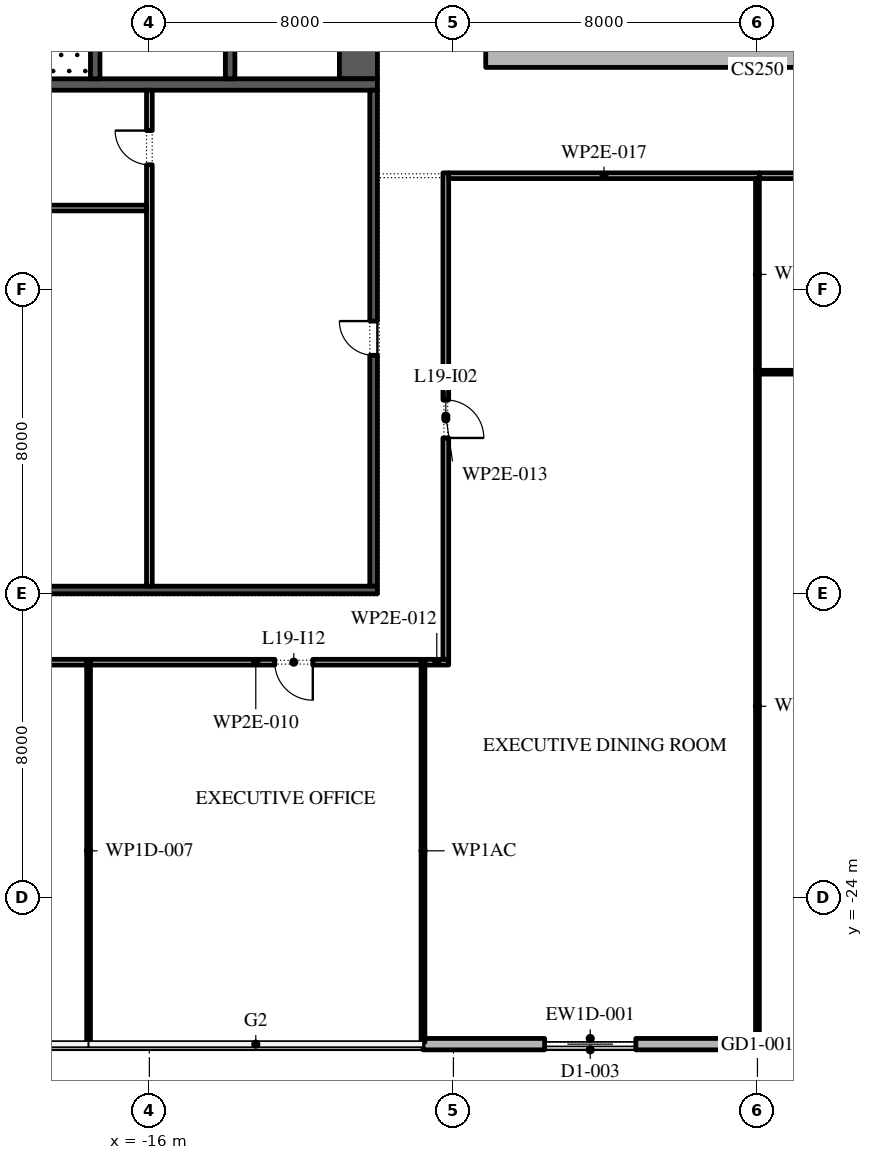
"""IFC4 building model, lengths in metres.
Left out: names, types, materials, properties, quantities, classifications, styles, units other than length and angle.
Written with IfcOpenShell. Run it as: python <this file> out.ifc"""

import sys

from ifc_helpers import new_model, si_unit, direction, frame, frame_2d, origin, place, context, subcontext, project, spatial, polyline, rectangle, outline, extrude, element, fill, save


model = new_model("IFC4")
c1 = context("Model", 3, precision=1e-05, world=origin(), true_north=direction((0.0, 1.0)))
c2 = subcontext(c1, "Body", "Model", "MODEL_VIEW")
j1 = project(units=[si_unit("LENGTHUNIT", "METRE"), si_unit("PLANEANGLEUNIT", "RADIAN")], contexts=[c1])
p1 = place(None, origin())
s1 = spatial("IfcSite", under=j1, at=p1, CompositionType="ELEMENT")
p2 = place(p1, origin())
s2 = spatial("IfcBuilding", under=s1, at=p2, CompositionType="ELEMENT")
p3 = place(p2, frame((0.0, 0.0, 90.0)))
s3 = spatial("IfcBuildingStorey", under=s2, at=p3, CompositionType="ELEMENT", Elevation=90.0)
p4 = place(p3, origin())
e1 = element("IfcWall", 1, at=p4, inside=s3, PredefinedType="STANDARD", context=c2, shape_type="SweptSolid", body=[
    extrude(outline(polyline([(-7.15, -2.15), (7.15, -2.15), (7.15, 16.15), (-7.15, 16.15), (-7.15, -2.15)]), holes=[polyline([(-7.0, -2.0), (-7.0, 16.0), (7.0, 16.0), (7.0, -2.0), (-7.0, -2.0)])]), origin(), (0.0, 0.0, 1.0), 3.9),
])
p5 = place(p3, frame((-8.8, -27.85, 0.0), z_axis=(0.0, 0.0, 1.0), x_axis=(1.0, 0.0, 0.0)))
e2 = element("IfcWall", 2, at=p5, inside=s3, PredefinedType="STANDARD", context=c2, shape_type="SweptSolid", body=[
    extrude(rectangle(XDim=8.8, YDim=0.3, at=frame_2d((4.4, 0.0))), origin(), (0.0, 0.0, 1.0), 3.9),
])
p6 = place(p5, frame((3.2, 0.0, 0.0)))
e3 = element("IfcOpeningElement", 3, at=p6, cuts=e2, PredefinedType="OPENING", context=c2, shape_type="SweptSolid", body=[
    extrude(rectangle(XDim=2.4, YDim=3.5, at=frame_2d((1.2, 1.75))), frame((0.0, 0.16, 0.0), z_axis=(0.0, -1.0, 0.0), x_axis=(1.0, 0.0, 0.0)), (0.0, 0.0, 1.0), 0.32),
])
p7 = place(p3, frame((-10.5, -2.45, 0.0), z_axis=(0.0, 0.0, 1.0), x_axis=(0.0, 1.0, 0.0)))
e4 = element("IfcWall", 4, at=p7, inside=s3, PredefinedType="SHEAR", context=c2, shape_type="SweptSolid", body=[
    extrude(rectangle(XDim=27.9, YDim=1.0, at=frame_2d((13.95, 0.0))), origin(), (0.0, 0.0, 1.0), 3.9),
])
p8 = place(p7, frame((23.65, 0.0, 0.0)))
e5 = element("IfcOpeningElement", 5, at=p8, cuts=e4, PredefinedType="OPENING", context=c2, shape_type="SweptSolid", body=[
    extrude(rectangle(XDim=2.4, YDim=2.1, at=frame_2d((1.2, 1.05))), frame((0.0, 0.51, 0.0), z_axis=(0.0, -1.0, 0.0), x_axis=(1.0, 0.0, 0.0)), (0.0, 0.0, 1.0), 1.02),
])
p9 = place(p7, frame((0.788, 0.0, 0.0)))
e6 = element("IfcOpeningElement", 6, at=p9, cuts=e4, PredefinedType="OPENING", context=c2, shape_type="SweptSolid", body=[
    extrude(rectangle(XDim=0.9, YDim=2.1, at=frame_2d((0.45, 1.05))), frame((0.0, 0.51, 0.0), z_axis=(0.0, -1.0, 0.0), x_axis=(1.0, 0.0, 0.0)), (0.0, 0.0, 1.0), 1.02),
])
p10 = place(p7, frame((4.012, 0.0, 0.0)))
e7 = element("IfcOpeningElement", 7, at=p10, cuts=e4, PredefinedType="OPENING", context=c2, shape_type="SweptSolid", body=[
    extrude(rectangle(XDim=0.9, YDim=2.1, at=frame_2d((0.45, 1.05))), frame((0.0, 0.51, 0.0), z_axis=(0.0, -1.0, 0.0), x_axis=(1.0, 0.0, 0.0)), (0.0, 0.0, 1.0), 1.02),
])
p11 = place(p3, frame((-22.0, -2.6, 0.0), z_axis=(0.0, 0.0, 1.0), x_axis=(1.0, 0.0, 0.0)))
e8 = element("IfcWall", 8, at=p11, inside=s3, PredefinedType="SHEAR", context=c2, shape_type="SweptSolid", body=[
    extrude(rectangle(XDim=12.0, YDim=0.3, at=frame_2d((6.0, 0.0))), origin(), (0.0, 0.0, 1.0), 3.9),
])
p12 = place(p3, frame((-17.425, -2.45, 0.0), z_axis=(0.0, 0.0, 1.0), x_axis=(0.0, 1.0, 0.0)))
e9 = element("IfcWall", 9, at=p12, inside=s3, PredefinedType="SHEAR", context=c2, shape_type="SweptSolid", body=[
    extrude(rectangle(XDim=6.3, YDim=0.25, at=frame_2d((3.15, 0.0))), origin(), (0.0, 0.0, 1.0), 3.9),
])
p13 = place(p12, frame((5.05, 0.0, 0.0)))
e10 = element("IfcOpeningElement", 10, at=p13, cuts=e9, PredefinedType="OPENING", context=c2, shape_type="SweptSolid", body=[
    extrude(rectangle(XDim=1.2, YDim=2.1, at=frame_2d((0.6, 1.05))), frame((0.0, 0.135, 0.0), z_axis=(0.0, -1.0, 0.0), x_axis=(1.0, 0.0, 0.0)), (0.0, 0.0, 1.0), 0.27),
])
p14 = place(p3, frame((-13.875, -2.45, 0.0), z_axis=(0.0, 0.0, 1.0), x_axis=(0.0, 1.0, 0.0)))
e11 = element("IfcWall", 11, at=p14, inside=s3, PredefinedType="SHEAR", context=c2, shape_type="SweptSolid", body=[
    extrude(rectangle(XDim=21.3, YDim=0.25, at=frame_2d((10.65, 0.0))), origin(), (0.0, 0.0, 1.0), 3.9),
])
p15 = place(p14, frame((10.396, 0.0, 0.0)))
e12 = element("IfcOpeningElement", 12, at=p15, cuts=e11, PredefinedType="OPENING", context=c2, shape_type="SweptSolid", body=[
    extrude(rectangle(XDim=0.9, YDim=2.1, at=frame_2d((0.45, 1.05))), frame((0.0, 0.135, 0.0), z_axis=(0.0, -1.0, 0.0), x_axis=(1.0, 0.0, 0.0)), (0.0, 0.0, 1.0), 0.27),
])
p16 = place(p14, frame((14.6, 0.0, 0.0)))
e13 = element("IfcOpeningElement", 13, at=p16, cuts=e11, PredefinedType="OPENING", context=c2, shape_type="SweptSolid", body=[
    extrude(rectangle(XDim=0.9, YDim=2.1, at=frame_2d((0.45, 1.05))), frame((0.0, 0.135, 0.0), z_axis=(0.0, -1.0, 0.0), x_axis=(1.0, 0.0, 0.0)), (0.0, 0.0, 1.0), 0.27),
])
p17 = place(p14, frame((18.775, 0.0, 0.0)))
e14 = element("IfcOpeningElement", 14, at=p17, cuts=e11, PredefinedType="OPENING", context=c2, shape_type="SweptSolid", body=[
    extrude(rectangle(XDim=0.9, YDim=2.1, at=frame_2d((0.45, 1.05))), frame((0.0, 0.135, 0.0), z_axis=(0.0, -1.0, 0.0), x_axis=(1.0, 0.0, 0.0)), (0.0, 0.0, 1.0), 0.27),
])
p18 = place(p14, frame((6.971, 0.0, 0.0)))
e15 = element("IfcOpeningElement", 15, at=p18, cuts=e11, PredefinedType="OPENING", context=c2, shape_type="SweptSolid", body=[
    extrude(rectangle(XDim=1.1, YDim=2.1, at=frame_2d((0.55, 1.05))), frame((0.0, 0.135, 0.0), z_axis=(0.0, -1.0, 0.0), x_axis=(1.0, 0.0, 0.0)), (0.0, 0.0, 1.0), 0.27),
])
p19 = place(p3, frame((-10.1, -15.8, 0.0), z_axis=(0.0, 0.0, 1.0), x_axis=(0.0, 1.0, 0.0)))
e16 = element("IfcWall", 16, at=p19, inside=s3, PredefinedType="SHEAR", context=c2, shape_type="SweptSolid", body=[
    extrude(rectangle(XDim=13.05, YDim=0.2, at=frame_2d((6.525, 0.0))), origin(), (0.0, 0.0, 1.0), 3.9),
])
p20 = place(p19, frame((6.075, 0.0, 0.0)))
e17 = element("IfcOpeningElement", 17, at=p20, cuts=e16, PredefinedType="OPENING", context=c2, shape_type="SweptSolid", body=[
    extrude(rectangle(XDim=0.9, YDim=2.1, at=frame_2d((0.45, 1.05))), frame((0.0, 0.11, 0.0), z_axis=(0.0, -1.0, 0.0), x_axis=(1.0, 0.0, 0.0)), (0.0, 0.0, 1.0), 0.22),
])
p21 = place(p3, frame((-22.0, -15.9, 0.0), z_axis=(0.0, 0.0, 1.0), x_axis=(1.0, 0.0, 0.0)))
e18 = element("IfcWall", 18, at=p21, inside=s3, PredefinedType="SHEAR", context=c2, shape_type="SweptSolid", body=[
    extrude(rectangle(XDim=12.0, YDim=0.2, at=frame_2d((6.0, 0.0))), origin(), (0.0, 0.0, 1.0), 3.9),
])
p22 = place(p3, frame((-16.0, -15.8, 0.0), z_axis=(0.0, 0.0, 1.0), x_axis=(0.0, 1.0, 0.0)))
e19 = element("IfcWall", 19, at=p22, inside=s3, PredefinedType="PARTITIONING", context=c2, shape_type="SweptSolid", body=[
    extrude(rectangle(XDim=13.05, YDim=0.15, at=frame_2d((6.525, 0.0))), origin(), (0.0, 0.0, 1.0), 3.9),
])
p23 = place(p22, frame((11.087, 0.0, 0.0)))
e20 = element("IfcOpeningElement", 20, at=p23, cuts=e19, PredefinedType="OPENING", context=c2, shape_type="SweptSolid", body=[
    extrude(rectangle(XDim=0.9, YDim=2.1, at=frame_2d((0.45, 1.05))), frame((0.0, 0.085, 0.0), z_axis=(0.0, -1.0, 0.0), x_axis=(1.0, 0.0, 0.0)), (0.0, 0.0, 1.0), 0.17),
])
p24 = place(p3, frame((-21.8, -5.85, 0.0), z_axis=(0.0, 0.0, 1.0), x_axis=(1.0, 0.0, 0.0)))
e21 = element("IfcWall", 21, at=p24, inside=s3, PredefinedType="PARTITIONING", context=c2, shape_type="SweptSolid", body=[
    extrude(rectangle(XDim=5.725, YDim=0.15, at=frame_2d((2.863, 0.0))), origin(), (0.0, 0.0, 1.0), 3.9),
])
p25 = place(p3, frame((-17.6, -27.8, 0.0), z_axis=(0.0, 0.0, 1.0), x_axis=(0.0, 1.0, 0.0)))
e22 = element("IfcWall", 22, at=p25, inside=s3, PredefinedType="PARTITIONING", context=c2, shape_type="SweptSolid", body=[
    extrude(rectangle(XDim=10.075, YDim=0.1, at=frame_2d((5.038, 0.0))), origin(), (0.0, 0.0, 1.0), 3.9),
])
p26 = place(p3, frame((-17.65, -17.8, 0.0), z_axis=(0.0, 0.0, 1.0), x_axis=(-1.0, 0.0, 0.0)))
e23 = element("IfcWall", 23, at=p26, inside=s3, PredefinedType="PARTITIONING", context=c2, shape_type="SweptSolid", body=[
    extrude(rectangle(XDim=6.075, YDim=0.15, at=frame_2d((3.038, 0.0))), origin(), (0.0, 0.0, 1.0), 3.9),
])
p27 = place(p26, frame((2.5, 0.0, 0.0)))
e24 = element("IfcOpeningElement", 24, at=p27, cuts=e23, PredefinedType="OPENING", context=c2, shape_type="SweptSolid", body=[
    extrude(rectangle(XDim=1.0, YDim=2.1, at=frame_2d((0.5, 1.05))), frame((0.0, 0.085, 0.0), z_axis=(0.0, -1.0, 0.0), x_axis=(1.0, 0.0, 0.0)), (0.0, 0.0, 1.0), 0.17),
])
p28 = place(p3, frame((-8.8, -27.8, 0.0), z_axis=(0.0, 0.0, 1.0), x_axis=(0.0, 1.0, 0.0)))
e25 = element("IfcWall", 25, at=p28, inside=s3, PredefinedType="PARTITIONING", context=c2, shape_type="SweptSolid", body=[
    extrude(rectangle(XDim=10.075, YDim=0.1, at=frame_2d((5.038, 0.0))), origin(), (0.0, 0.0, 1.0), 3.222),
])
p29 = place(p3, frame((-8.85, -17.8, 0.0), z_axis=(0.0, 0.0, 1.0), x_axis=(-1.0, 0.0, 0.0)))
e26 = element("IfcWall", 26, at=p29, inside=s3, PredefinedType="PARTITIONING", context=c2, shape_type="SweptSolid", body=[
    extrude(rectangle(XDim=8.7, YDim=0.15, at=frame_2d((4.35, 0.0))), origin(), (0.0, 0.0, 1.0), 3.9),
])
p30 = place(p29, frame((2.85, 0.0, 0.0)))
e27 = element("IfcOpeningElement", 27, at=p30, cuts=e26, PredefinedType="OPENING", context=c2, shape_type="SweptSolid", body=[
    extrude(rectangle(XDim=1.0, YDim=2.1, at=frame_2d((0.5, 1.05))), frame((0.0, 0.085, 0.0), z_axis=(0.0, -1.0, 0.0), x_axis=(1.0, 0.0, 0.0)), (0.0, 0.0, 1.0), 0.17),
])
p31 = place(p3, frame((-8.125, -17.8, 0.0), z_axis=(0.0, 0.0, 1.0), x_axis=(-1.0, 0.0, 0.0)))
e28 = element("IfcWall", 28, at=p31, inside=s3, PredefinedType="PARTITIONING", context=c2, shape_type="SweptSolid", body=[
    extrude(rectangle(XDim=0.625, YDim=0.15, at=frame_2d((0.312, 0.0))), origin(), (0.0, 0.0, 1.0), 3.9),
])
p32 = place(p3, frame((-8.2, -4.925, 0.0), z_axis=(0.0, 0.0, 1.0), x_axis=(0.0, -1.0, 0.0)))
e29 = element("IfcWall", 29, at=p32, inside=s3, PredefinedType="PARTITIONING", context=c2, shape_type="SweptSolid", body=[
    extrude(rectangle(XDim=12.8, YDim=0.15, at=frame_2d((6.4, 0.0))), origin(), (0.0, 0.0, 1.0), 3.9),
])
p33 = place(p32, frame((5.975, 0.0, 0.0)))
e30 = element("IfcOpeningElement", 30, at=p33, cuts=e29, PredefinedType="OPENING", context=c2, shape_type="SweptSolid", body=[
    extrude(rectangle(XDim=1.0, YDim=2.1, at=frame_2d((0.5, 1.05))), frame((0.0, 0.085, 0.0), z_axis=(0.0, -1.0, 0.0), x_axis=(1.0, 0.0, 0.0)), (0.0, 0.0, 1.0), 0.17),
])
p34 = place(p3, frame((0.0, -10.12, 0.0), z_axis=(0.0, 0.0, 1.0), x_axis=(0.0, -1.0, 0.0)))
e31 = element("IfcWall", 31, at=p34, inside=s3, PredefinedType="PARTITIONING", context=c2, shape_type="SweptSolid", body=[
    extrude(rectangle(XDim=17.68, YDim=0.1, at=frame_2d((8.84, 0.0))), origin(), (0.0, 0.0, 1.0), 3.9),
])
p35 = place(p3, frame((0.05, -5.0, 0.0), z_axis=(0.0, 0.0, 1.0), x_axis=(-1.0, 0.0, 0.0)))
e32 = element("IfcWall", 32, at=p35, inside=s3, PredefinedType="PARTITIONING", context=c2, shape_type="SweptSolid", body=[
    extrude(rectangle(XDim=8.175, YDim=0.15, at=frame_2d((4.087, 0.0))), origin(), (0.0, 0.0, 1.0), 3.9),
])
p36 = place(p3, frame((0.0, -5.075, 0.0), z_axis=(0.0, 0.0, 1.0), x_axis=(0.0, -1.0, 0.0)))
e33 = element("IfcWall", 33, at=p36, inside=s3, PredefinedType="PARTITIONING", context=c2, shape_type="SweptSolid", body=[
    extrude(rectangle(XDim=5.045, YDim=0.1, at=frame_2d((2.522, 0.0))), origin(), (0.0, 0.0, 1.0), 3.9),
])
p37 = place(p3, frame((8.125, -10.17, 0.0), z_axis=(0.0, 0.0, 1.0), x_axis=(-1.0, 0.0, 0.0)))
e34 = element("IfcWall", 34, at=p37, inside=s3, PredefinedType="PARTITIONING", context=c2, shape_type="SweptSolid", body=[
    extrude(rectangle(XDim=8.075, YDim=0.1, at=frame_2d((4.038, 0.0))), origin(), (0.0, 0.0, 1.0), 3.9),
])
p38 = place(p3, frame((8.125, -5.0, 0.0), z_axis=(0.0, 0.0, 1.0), x_axis=(-1.0, 0.0, 0.0)))
e35 = element("IfcWall", 35, at=p38, inside=s3, PredefinedType="PARTITIONING", context=c2, shape_type="SweptSolid", body=[
    extrude(rectangle(XDim=8.075, YDim=0.15, at=frame_2d((4.038, 0.0))), origin(), (0.0, 0.0, 1.0), 3.9),
])
p39 = place(p38, frame((4.225, 0.0, 0.0)))
e36 = element("IfcOpeningElement", 36, at=p39, cuts=e35, PredefinedType="OPENING", context=c2, shape_type="SweptSolid", body=[
    extrude(rectangle(XDim=1.0, YDim=2.1, at=frame_2d((0.5, 1.05))), frame((0.0, 0.085, 0.0), z_axis=(0.0, -1.0, 0.0), x_axis=(1.0, 0.0, 0.0)), (0.0, 0.0, 1.0), 0.17),
])
p40 = place(p6, origin())
e37 = element("IfcDoor", 37, at=p40, inside=s3, OperationType="DOUBLE_DOOR_SLIDING", PredefinedType="DOOR", context=c2, shape_type="SweptSolid", body=[
    extrude(rectangle(XDim=2.4, YDim=3.5, at=frame_2d((1.2, 1.75))), frame((0.0, 0.025, 0.0), z_axis=(0.0, -1.0, 0.0), x_axis=(1.0, 0.0, 0.0)), (0.0, 0.0, 1.0), 0.05),
])
fill(e3, e37)
p41 = place(p23, origin())
e38 = element("IfcDoor", 38, at=p41, inside=s3, OperationType="SINGLE_SWING_LEFT", PredefinedType="DOOR", context=c2, shape_type="SweptSolid", body=[
    extrude(rectangle(XDim=0.9, YDim=2.1, at=frame_2d((0.45, 1.05))), frame((0.0, 0.025, 0.0), z_axis=(0.0, -1.0, 0.0), x_axis=(1.0, 0.0, 0.0)), (0.0, 0.0, 1.0), 0.05),
])
fill(e20, e38)
p42 = place(p20, origin())
e39 = element("IfcDoor", 39, at=p42, inside=s3, OperationType="SINGLE_SWING_LEFT", PredefinedType="DOOR", context=c2, shape_type="SweptSolid", body=[
    extrude(rectangle(XDim=0.9, YDim=2.1, at=frame_2d((0.45, 1.05))), frame((0.0, 0.1, 0.0), z_axis=(0.0, -1.0, 0.0), x_axis=(1.0, 0.0, 0.0)), (0.0, 0.0, 1.0), 0.05),
])
fill(e17, e39)
p43 = place(p33, origin())
e40 = element("IfcDoor", 40, at=p43, inside=s3, OperationType="SINGLE_SWING_LEFT", PredefinedType="DOOR", context=c2, shape_type="SweptSolid", body=[
    extrude(rectangle(XDim=1.0, YDim=2.1, at=frame_2d((0.5, 1.05))), frame((0.0, 0.025, 0.0), z_axis=(0.0, -1.0, 0.0), x_axis=(1.0, 0.0, 0.0)), (0.0, 0.0, 1.0), 0.05),
])
fill(e30, e40)
p44 = place(p30, origin())
e41 = element("IfcDoor", 41, at=p44, inside=s3, OperationType="SINGLE_SWING_RIGHT", PredefinedType="DOOR", context=c2, shape_type="SweptSolid", body=[
    extrude(rectangle(XDim=1.0, YDim=2.1, at=frame_2d((0.5, 1.05))), frame((0.0, 0.025, 0.0), z_axis=(0.0, -1.0, 0.0), x_axis=(1.0, 0.0, 0.0)), (0.0, 0.0, 1.0), 0.05),
])
fill(e27, e41)
save(model, sys.argv[1])
